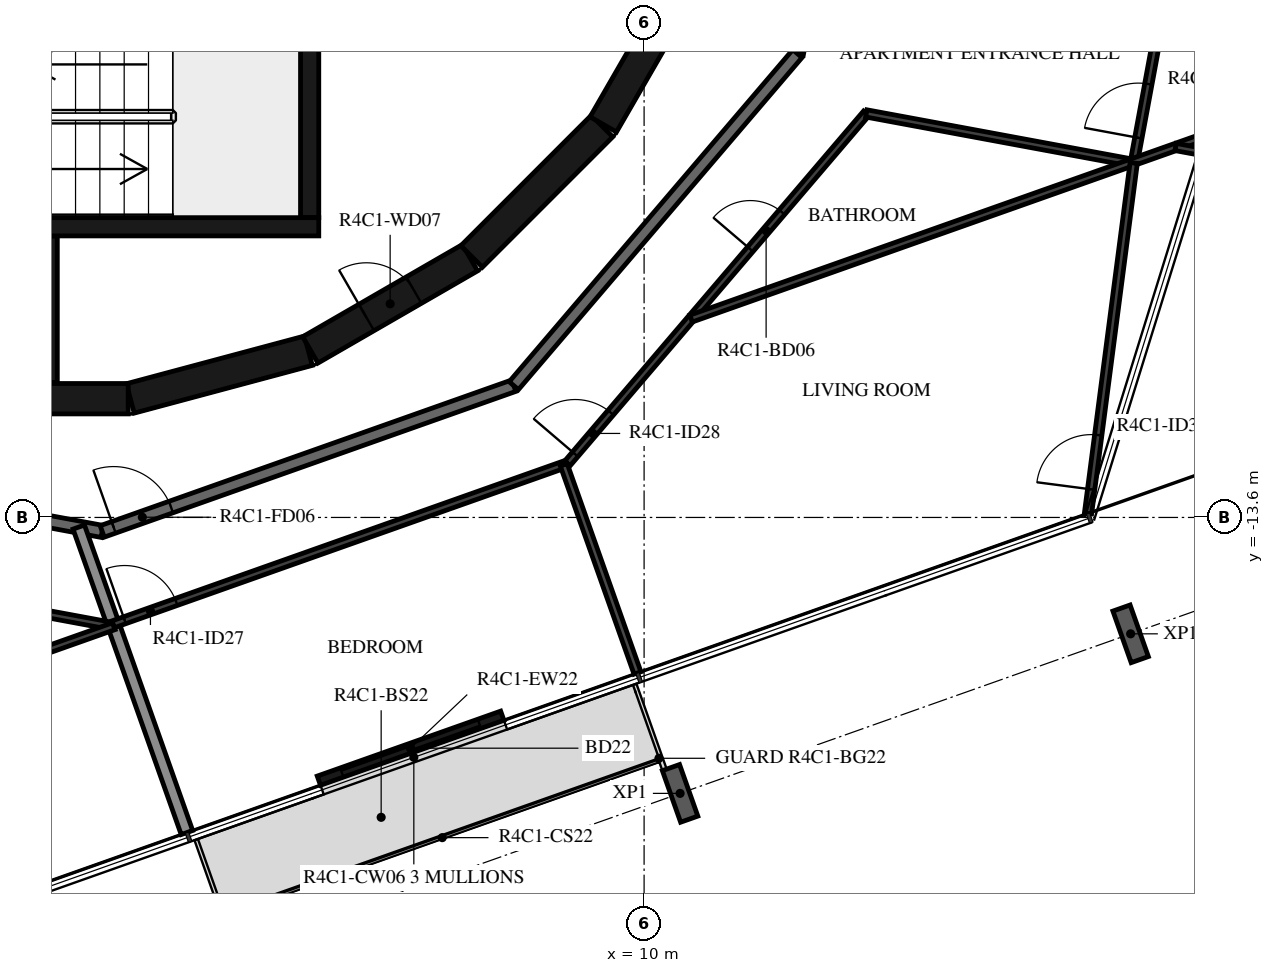
"""IFC4 building model, lengths in metres.
Left out: names, types, materials, properties, quantities, classifications, styles, units other than length and angle.
Written with IfcOpenShell. Run it as: python <this file> out.ifc"""

import sys

from ifc_helpers import new_model, si_unit, direction, frame, frame_2d, origin, origin_2d, place, context, subcontext, project, spatial, rectangle, i_section, extrude, element, fill, save


model = new_model("IFC4")
c1 = context("Model", 3, precision=1e-05, world=origin(), true_north=direction((0.0, 1.0)))
c2 = subcontext(c1, "Body", "Model", "MODEL_VIEW")
j1 = project(units=[si_unit("LENGTHUNIT", "METRE"), si_unit("PLANEANGLEUNIT", "RADIAN")], contexts=[c1])
p1 = place(None, origin())
s1 = spatial("IfcSite", under=j1, at=p1, CompositionType="ELEMENT")
p2 = place(p1, origin())
s2 = spatial("IfcBuilding", under=s1, at=p2, CompositionType="ELEMENT")
p3 = place(p2, frame((0.0, 0.0, 176.2)))
s3 = spatial("IfcBuildingStorey", under=s2, at=p3, CompositionType="ELEMENT", Elevation=176.2)
for number, where, z_axis, x_axis in (
    (1, (10.592, -18.138, -0.38), (0.0, 0.0, 1.0), (-0.943, -0.334, 0.0)),
    (2, (18.001, -15.514, -0.38), (0.0, 0.0, 1.0), (-0.943, -0.334, 0.0)),
):
    element("IfcColumn", number, at=place(p3, frame(where, z_axis=z_axis, x_axis=x_axis)), inside=s3, PredefinedType="COLUMN", context=c2, shape_type="SweptSolid", body=[
        extrude(i_section(OverallWidth=0.3, OverallDepth=0.9, WebThickness=0.019, FlangeThickness=0.035, FilletRadius=0.03, at=origin_2d()), origin(), (0.0, 0.0, 1.0), 3.5),
    ])
p4 = place(p3, frame((4.652, -17.929, 0.0), z_axis=(0.0, 0.0, 1.0), x_axis=(0.942620722428, 0.333865502335, 0.0)))
e3 = element("IfcWall", 3, at=p4, inside=s3, PredefinedType="STANDARD", context=c2, shape_type="SweptSolid", body=[
    extrude(rectangle(XDim=3.2, YDim=0.16, at=frame_2d((1.6, 0.0))), origin(), (0.0, 0.0, 1.0), 3.12),
])
p5 = place(p4, frame((0.4, 0.0, 0.0)))
e4 = element("IfcOpeningElement", 4, at=p5, cuts=e3, PredefinedType="OPENING", context=c2, shape_type="SweptSolid", body=[
    extrude(rectangle(XDim=2.4, YDim=2.4, at=frame_2d((1.2, 1.2))), frame((0.0, 0.09, 0.0), z_axis=(0.0, -1.0, 0.0), x_axis=(1.0, 0.0, 0.0)), (0.0, 0.0, 1.0), 0.18),
])
p6 = place(p3, frame((1.55, -11.643, 0.0), z_axis=(0.0, 0.0, 1.0), x_axis=(0.965948410781, 0.258734743916, 0.0)))
e5 = element("IfcWall", 5, at=p6, inside=s3, PredefinedType="SHEAR", context=c2, shape_type="SweptSolid", body=[
    extrude(rectangle(XDim=3.033, YDim=0.5, at=frame_2d((1.516, 0.0))), origin(), (0.0, 0.0, 1.0), 3.12),
])
p7 = place(p3, frame((4.51, -10.845, 0.0), z_axis=(0.0, 0.0, 1.0), x_axis=(0.865975092491, 0.500087131594, 0.0)))
e6 = element("IfcWall", 6, at=p7, inside=s3, PredefinedType="SHEAR", context=c2, shape_type="SweptSolid", body=[
    extrude(rectangle(XDim=3.033, YDim=0.5, at=frame_2d((1.516, 0.0))), origin(), (0.0, 0.0, 1.0), 3.12),
])
p8 = place(p7, frame((1.066, 0.0, 0.0)))
e7 = element("IfcOpeningElement", 7, at=p8, cuts=e6, PredefinedType="OPENING", context=c2, shape_type="SweptSolid", body=[
    extrude(rectangle(XDim=0.9, YDim=2.1, at=frame_2d((0.45, 1.05))), frame((0.0, 0.26, 0.0), z_axis=(0.0, -1.0, 0.0), x_axis=(1.0, 0.0, 0.0)), (0.0, 0.0, 1.0), 0.52),
])
p9 = place(p3, frame((7.164, -9.308, 0.0), z_axis=(0.0, 0.0, 1.0), x_axis=(0.707106781187, 0.707106781187, 0.0)))
e8 = element("IfcWall", 8, at=p9, inside=s3, PredefinedType="SHEAR", context=c2, shape_type="SweptSolid", body=[
    extrude(rectangle(XDim=3.032, YDim=0.5, at=frame_2d((1.516, 0.0))), origin(), (0.0, 0.0, 1.0), 3.12),
])
p10 = place(p3, frame((9.329, -7.137, 0.0), z_axis=(0.0, 0.0, 1.0), x_axis=(0.500087131594, 0.865975092491, 0.0)))
e9 = element("IfcWall", 9, at=p10, inside=s3, PredefinedType="SHEAR", context=c2, shape_type="SweptSolid", body=[
    extrude(rectangle(XDim=3.033, YDim=0.5, at=frame_2d((1.516, 0.0))), origin(), (0.0, 0.0, 1.0), 3.12),
])
p11 = place(p3, frame((-1.516, -11.647, 0.0), z_axis=(0.0, 0.0, 1.0), x_axis=(1.0, 0.0, 0.0)))
e10 = element("IfcWall", 10, at=p11, inside=s3, PredefinedType="SHEAR", context=c2, shape_type="SweptSolid", body=[
    extrude(rectangle(XDim=3.033, YDim=0.5, at=frame_2d((1.516, 0.0))), origin(), (0.0, 0.0, 1.0), 3.12),
])
p12 = place(p11, frame((0.016, 0.0, 0.0)))
e11 = element("IfcOpeningElement", 11, at=p12, cuts=e10, PredefinedType="OPENING", context=c2, shape_type="SweptSolid", body=[
    extrude(rectangle(XDim=1.2, YDim=2.1, at=frame_2d((0.6, 1.05))), frame((0.0, 0.26, 0.0), z_axis=(0.0, -1.0, 0.0), x_axis=(1.0, 0.0, 0.0)), (0.0, 0.0, 1.0), 0.52),
])
p13 = place(p3, frame((4.5, -8.67, 0.0), z_axis=(0.0, 0.0, 1.0), x_axis=(0.0, 1.0, 0.0)))
e12 = element("IfcWall", 12, at=p13, inside=s3, PredefinedType="SHEAR", context=c2, shape_type="SweptSolid", body=[
    extrude(rectangle(XDim=3.32, YDim=0.3, at=frame_2d((1.66, 0.0))), origin(), (0.0, 0.0, 1.0), 3.12),
])
p14 = place(p3, frame((0.1, -8.82, 0.0), z_axis=(0.0, 0.0, 1.0), x_axis=(1.0, 0.0, 0.0)))
e13 = element("IfcWall", 13, at=p14, inside=s3, PredefinedType="SHEAR", context=c2, shape_type="SweptSolid", body=[
    extrude(rectangle(XDim=4.55, YDim=0.3, at=frame_2d((2.275, 0.0))), origin(), (0.0, 0.0, 1.0), 3.12),
])
p15 = place(p3, frame((0.225, -8.97, 0.0), z_axis=(0.0, 0.0, 1.0), x_axis=(0.0, -1.0, 0.0)))
e14 = element("IfcWall", 14, at=p15, inside=s3, PredefinedType="SHEAR", context=c2, shape_type="SweptSolid", body=[
    extrude(rectangle(XDim=2.41, YDim=0.25, at=frame_2d((1.205, 0.0))), origin(), (0.0, 0.0, 1.0), 3.12),
])
p16 = place(p3, frame((12.521, -5.972, 0.0), z_axis=(0.0, 0.0, 1.0), x_axis=(0.182244189886, 0.983253301674, 0.0)))
e15 = element("IfcWall", 15, at=p16, inside=s3, PredefinedType="STANDARD", context=c2, shape_type="SweptSolid", body=[
    extrude(rectangle(XDim=4.176, YDim=0.2, at=frame_2d((2.088, 0.0))), origin(), (0.0, 0.0, 1.0), 3.12),
])
p17 = place(p16, frame((2.645, 0.0, 0.0)))
e16 = element("IfcOpeningElement", 16, at=p17, cuts=e15, PredefinedType="OPENING", context=c2, shape_type="SweptSolid", body=[
    extrude(rectangle(XDim=1.2, YDim=2.1, at=frame_2d((0.6, 1.05))), frame((0.0, 0.11, 0.0), z_axis=(0.0, -1.0, 0.0), x_axis=(1.0, 0.0, 0.0)), (0.0, 0.0, 1.0), 0.22),
])
p18 = place(p3, frame((-5.972, -12.521, 0.0), z_axis=(0.0, 0.0, 1.0), x_axis=(0.983256068163, -0.18222926335, 0.0)))
e17 = element("IfcWall", 17, at=p18, inside=s3, PredefinedType="STANDARD", context=c2, shape_type="SweptSolid", body=[
    extrude(rectangle(XDim=7.181, YDim=0.2, at=frame_2d((3.59, 0.0))), origin(), (0.0, 0.0, 1.0), 3.12),
])
p19 = place(p18, frame((4.7, 0.0, 0.0)))
e18 = element("IfcOpeningElement", 18, at=p19, cuts=e17, PredefinedType="OPENING", context=c2, shape_type="SweptSolid", body=[
    extrude(rectangle(XDim=1.0, YDim=2.1, at=frame_2d((0.5, 1.05))), frame((0.0, 0.11, 0.0), z_axis=(0.0, -1.0, 0.0), x_axis=(1.0, 0.0, 0.0)), (0.0, 0.0, 1.0), 0.22),
])
p20 = place(p3, frame((1.088, -13.83, 0.0), z_axis=(0.0, 0.0, 1.0), x_axis=(0.942648397945, 0.333787354241, 0.0)))
e19 = element("IfcWall", 19, at=p20, inside=s3, PredefinedType="STANDARD", context=c2, shape_type="SweptSolid", body=[
    extrude(rectangle(XDim=7.181, YDim=0.2, at=frame_2d((3.591, 0.0))), origin(), (0.0, 0.0, 1.0), 3.12),
])
p21 = place(p20, frame((0.2, 0.0, 0.0)))
e20 = element("IfcOpeningElement", 20, at=p21, cuts=e19, PredefinedType="OPENING", context=c2, shape_type="SweptSolid", body=[
    extrude(rectangle(XDim=1.0, YDim=2.1, at=frame_2d((0.5, 1.05))), frame((0.0, 0.11, 0.0), z_axis=(0.0, -1.0, 0.0), x_axis=(1.0, 0.0, 0.0)), (0.0, 0.0, 1.0), 0.22),
])
p22 = place(p3, frame((7.858, -11.433, 0.0), z_axis=(0.0, 0.0, 1.0), x_axis=(0.649440801937, 0.760412154545, 0.0)))
e21 = element("IfcWall", 21, at=p22, inside=s3, PredefinedType="STANDARD", context=c2, shape_type="SweptSolid", body=[
    extrude(rectangle(XDim=7.181, YDim=0.2, at=frame_2d((3.59, 0.0))), origin(), (0.0, 0.0, 1.0), 3.12),
])
p23 = place(p3, frame((2.482, -18.782, 0.0), z_axis=(0.0, 0.0, 1.0), x_axis=(-0.333807281402, 0.942641341594, 0.0)))
e22 = element("IfcWall", 22, at=p23, inside=s3, PredefinedType="STANDARD", context=c2, shape_type="SweptSolid", body=[
    extrude(rectangle(XDim=5.329, YDim=0.2, at=frame_2d((2.665, 0.0))), origin(), (0.0, 0.0, 1.0), 2.73),
])
p24 = place(p3, frame((-6.641, -13.923, 0.0), z_axis=(0.0, 0.0, 1.0), x_axis=(0.983250157272, -0.182261153912, 0.0)))
e23 = element("IfcWall", 23, at=p24, inside=s3, PredefinedType="PARTITIONING", context=c2, shape_type="SweptSolid", body=[
    extrude(rectangle(XDim=7.985, YDim=0.12, at=frame_2d((3.992, 0.0))), origin(), (0.0, 0.0, 1.0), 3.12),
])
p25 = place(p24, frame((1.612, 0.0, 0.0)))
e24 = element("IfcOpeningElement", 24, at=p25, cuts=e23, PredefinedType="OPENING", context=c2, shape_type="SweptSolid", body=[
    extrude(rectangle(XDim=0.8, YDim=2.1, at=frame_2d((0.4, 1.05))), frame((0.0, 0.07, 0.0), z_axis=(0.0, -1.0, 0.0), x_axis=(1.0, 0.0, 0.0)), (0.0, 0.0, 1.0), 0.14),
])
p26 = place(p3, frame((-12.015, -20.096, 0.0), z_axis=(0.0, 0.0, 1.0), x_axis=(0.942638913957, 0.33381413675, 0.0)))
e25 = element("IfcWall", 25, at=p26, inside=s3, PredefinedType="PARTITIONING", context=c2, shape_type="SweptSolid", body=[
    extrude(rectangle(XDim=14.104, YDim=0.12, at=frame_2d((7.052, 0.0))), origin(), (0.0, 0.0, 1.0), 3.12),
])
p27 = place(p26, frame((2.814, 0.0, 0.0)))
e26 = element("IfcOpeningElement", 26, at=p27, cuts=e25, PredefinedType="OPENING", context=c2, shape_type="SweptSolid", body=[
    extrude(rectangle(XDim=0.9, YDim=2.1, at=frame_2d((0.45, 1.05))), frame((0.0, 0.07, 0.0), z_axis=(0.0, -1.0, 0.0), x_axis=(1.0, 0.0, 0.0)), (0.0, 0.0, 1.0), 0.14),
])
p28 = place(p26, frame((6.444, 0.0, 0.0)))
e27 = element("IfcOpeningElement", 27, at=p28, cuts=e25, PredefinedType="OPENING", context=c2, shape_type="SweptSolid", body=[
    extrude(rectangle(XDim=0.9, YDim=2.1, at=frame_2d((0.45, 1.05))), frame((0.0, 0.07, 0.0), z_axis=(0.0, -1.0, 0.0), x_axis=(1.0, 0.0, 0.0)), (0.0, 0.0, 1.0), 0.14),
])
p29 = place(p26, frame((0.2, 0.0, 0.0)))
e28 = element("IfcOpeningElement", 28, at=p29, cuts=e25, PredefinedType="OPENING", context=c2, shape_type="SweptSolid", body=[
    extrude(rectangle(XDim=0.9, YDim=2.1, at=frame_2d((0.45, 1.05))), frame((0.0, 0.07, 0.0), z_axis=(0.0, -1.0, 0.0), x_axis=(1.0, 0.0, 0.0)), (0.0, 0.0, 1.0), 0.14),
])
p30 = place(p3, frame((1.269, -15.357, 0.0), z_axis=(0.0, 0.0, 1.0), x_axis=(0.942639442898, 0.333812643101, 0.0)))
e29 = element("IfcWall", 29, at=p30, inside=s3, PredefinedType="PARTITIONING", context=c2, shape_type="SweptSolid", body=[
    extrude(rectangle(XDim=7.86, YDim=0.12, at=frame_2d((3.93, 0.0))), origin(), (0.0, 0.0, 1.0), 3.12),
])
p31 = place(p30, frame((0.2, 0.0, 0.0)))
e30 = element("IfcOpeningElement", 30, at=p31, cuts=e29, PredefinedType="OPENING", context=c2, shape_type="SweptSolid", body=[
    extrude(rectangle(XDim=0.9, YDim=2.1, at=frame_2d((0.45, 1.05))), frame((0.0, 0.07, 0.0), z_axis=(0.0, -1.0, 0.0), x_axis=(1.0, 0.0, 0.0)), (0.0, 0.0, 1.0), 0.14),
])
p32 = place(p3, frame((8.737, -12.713, 0.0), z_axis=(0.0, 0.0, 1.0), x_axis=(0.649427973074, 0.760423111031, 0.0)))
e31 = element("IfcWall", 31, at=p32, inside=s3, PredefinedType="PARTITIONING", context=c2, shape_type="SweptSolid", body=[
    extrude(rectangle(XDim=7.571, YDim=0.12, at=frame_2d((3.785, 0.0))), origin(), (0.0, 0.0, 1.0), 3.12),
])
p33 = place(p32, frame((0.2, 0.0, 0.0)))
e32 = element("IfcOpeningElement", 32, at=p33, cuts=e31, PredefinedType="OPENING", context=c2, shape_type="SweptSolid", body=[
    extrude(rectangle(XDim=0.9, YDim=2.1, at=frame_2d((0.45, 1.05))), frame((0.0, 0.07, 0.0), z_axis=(0.0, -1.0, 0.0), x_axis=(1.0, 0.0, 0.0)), (0.0, 0.0, 1.0), 0.14),
])
p34 = place(p32, frame((4.634, 0.0, 0.0)))
e33 = element("IfcOpeningElement", 33, at=p34, cuts=e31, PredefinedType="OPENING", context=c2, shape_type="SweptSolid", body=[
    extrude(rectangle(XDim=0.8, YDim=2.1, at=frame_2d((0.4, 1.05))), frame((0.0, 0.07, 0.0), z_axis=(0.0, -1.0, 0.0), x_axis=(1.0, 0.0, 0.0)), (0.0, 0.0, 1.0), 0.14),
])
p35 = place(p3, frame((13.654, -6.956, 0.0), z_axis=(0.0, 0.0, 1.0), x_axis=(0.983253166233, -0.18224492062, 0.0)))
e34 = element("IfcWall", 34, at=p35, inside=s3, PredefinedType="PARTITIONING", context=c2, shape_type="SweptSolid", body=[
    extrude(rectangle(XDim=4.437, YDim=0.12, at=frame_2d((2.218, 0.0))), origin(), (0.0, 0.0, 1.0), 3.12),
])
p36 = place(p3, frame((18.055, -7.75, 0.0), z_axis=(0.0, 0.0, 1.0), x_axis=(0.18225497314, 0.983251302957, 0.0)))
e35 = element("IfcWall", 35, at=p36, inside=s3, PredefinedType="PARTITIONING", context=c2, shape_type="SweptSolid", body=[
    extrude(rectangle(XDim=2.479, YDim=0.12, at=frame_2d((1.24, 0.0))), origin(), (0.0, 0.0, 1.0), 3.12),
])
p37 = place(p36, frame((0.4, 0.0, 0.0)))
e36 = element("IfcOpeningElement", 36, at=p37, cuts=e35, PredefinedType="OPENING", context=c2, shape_type="SweptSolid", body=[
    extrude(rectangle(XDim=0.9, YDim=2.1, at=frame_2d((0.45, 1.05))), frame((0.0, 0.07, 0.0), z_axis=(0.0, -1.0, 0.0), x_axis=(1.0, 0.0, 0.0)), (0.0, 0.0, 1.0), 0.14),
])
p38 = place(p3, frame((9.891, -16.158, 0.0), z_axis=(0.0, 0.0, 1.0), x_axis=(-0.33385336213, 0.942625022262, 0.0)))
e37 = element("IfcWall", 37, at=p38, inside=s3, PredefinedType="PARTITIONING", context=c2, shape_type="SweptSolid", body=[
    extrude(rectangle(XDim=3.633, YDim=0.12, at=frame_2d((1.816, 0.0))), origin(), (0.0, 0.0, 1.0), 2.73),
])
p39 = place(p3, frame((21.362, -6.58, 0.0), z_axis=(0.0, 0.0, 1.0), x_axis=(-0.942647598157, -0.333789612913, 0.0)))
e38 = element("IfcWall", 38, at=p39, inside=s3, PredefinedType="PARTITIONING", context=c2, shape_type="SweptSolid", body=[
    extrude(rectangle(XDim=11.234, YDim=0.12, at=frame_2d((5.617, 0.0))), origin(), (0.0, 0.0, 1.0), 3.12),
])
p40 = place(p3, frame((17.3, -13.534, 0.0), z_axis=(0.0, 0.0, 1.0), x_axis=(0.129290698847, 0.99160673414, 0.0)))
e39 = element("IfcWall", 39, at=p40, inside=s3, PredefinedType="PARTITIONING", context=c2, shape_type="SweptSolid", body=[
    extrude(rectangle(XDim=5.812, YDim=0.12, at=frame_2d((2.906, 0.0))), origin(), (0.0, 0.0, 1.0), 3.12),
])
p41 = place(p40, frame((0.4, 0.0, 0.0)))
e40 = element("IfcOpeningElement", 40, at=p41, cuts=e39, PredefinedType="OPENING", context=c2, shape_type="SweptSolid", body=[
    extrude(rectangle(XDim=0.9, YDim=2.1, at=frame_2d((0.45, 1.05))), frame((0.0, 0.07, 0.0), z_axis=(0.0, -1.0, 0.0), x_axis=(1.0, 0.0, 0.0)), (0.0, 0.0, 1.0), 0.14),
])
p42 = place(p3, frame((26.774, -8.997, 0.0), z_axis=(0.0, 0.0, 1.0), x_axis=(-0.983258019748, 0.18221873285, 0.0)))
e41 = element("IfcWall", 41, at=p42, inside=s3, PredefinedType="PARTITIONING", context=c2, shape_type="SweptSolid", body=[
    extrude(rectangle(XDim=8.17, YDim=0.12, at=frame_2d((4.085, 0.0))), origin(), (0.0, 0.0, 1.0), 3.12),
])
p43 = place(p42, frame((0.5, 0.0, 0.0)))
e42 = element("IfcOpeningElement", 42, at=p43, cuts=e41, PredefinedType="OPENING", context=c2, shape_type="SweptSolid", body=[
    extrude(rectangle(XDim=0.9, YDim=2.1, at=frame_2d((0.45, 1.05))), frame((0.0, 0.07, 0.0), z_axis=(0.0, -1.0, 0.0), x_axis=(1.0, 0.0, 0.0)), (0.0, 0.0, 1.0), 0.14),
])
p44 = place(p5, origin())
e43 = element("IfcDoor", 43, at=p44, inside=s3, OperationType="DOUBLE_DOOR_SLIDING", PredefinedType="DOOR", context=c2, shape_type="SweptSolid", body=[
    extrude(rectangle(XDim=2.4, YDim=2.4, at=frame_2d((1.2, 1.2))), frame((0.0, 0.025, 0.0), z_axis=(0.0, -1.0, 0.0), x_axis=(1.0, 0.0, 0.0)), (0.0, 0.0, 1.0), 0.05),
])
fill(e4, e43)
p45 = place(p8, origin())
e44 = element("IfcDoor", 44, at=p45, inside=s3, OperationType="SINGLE_SWING_LEFT", PredefinedType="DOOR", context=c2, shape_type="SweptSolid", body=[
    extrude(rectangle(XDim=0.9, YDim=2.1, at=frame_2d((0.45, 1.05))), frame((0.0, 0.025, 0.0), z_axis=(0.0, -1.0, 0.0), x_axis=(1.0, 0.0, 0.0)), (0.0, 0.0, 1.0), 0.05),
])
fill(e7, e44)
p46 = place(p21, origin())
e45 = element("IfcDoor", 45, at=p46, inside=s3, OperationType="SINGLE_SWING_LEFT", PredefinedType="DOOR", context=c2, shape_type="SweptSolid", body=[
    extrude(rectangle(XDim=1.0, YDim=2.1, at=frame_2d((0.5, 1.05))), frame((0.0, 0.025, 0.0), z_axis=(0.0, -1.0, 0.0), x_axis=(1.0, 0.0, 0.0)), (0.0, 0.0, 1.0), 0.05),
])
fill(e20, e45)
p47 = place(p31, origin())
e46 = element("IfcDoor", 46, at=p47, inside=s3, OperationType="SINGLE_SWING_LEFT", PredefinedType="DOOR", context=c2, shape_type="SweptSolid", body=[
    extrude(rectangle(XDim=0.9, YDim=2.1, at=frame_2d((0.45, 1.05))), frame((0.0, 0.025, 0.0), z_axis=(0.0, -1.0, 0.0), x_axis=(1.0, 0.0, 0.0)), (0.0, 0.0, 1.0), 0.05),
])
fill(e30, e46)
p48 = place(p33, origin())
e47 = element("IfcDoor", 47, at=p48, inside=s3, OperationType="SINGLE_SWING_RIGHT", PredefinedType="DOOR", context=c2, shape_type="SweptSolid", body=[
    extrude(rectangle(XDim=0.9, YDim=2.1, at=frame_2d((0.45, 1.05))), frame((0.0, 0.025, 0.0), z_axis=(0.0, -1.0, 0.0), x_axis=(1.0, 0.0, 0.0)), (0.0, 0.0, 1.0), 0.05),
])
fill(e32, e47)
p49 = place(p34, origin())
e48 = element("IfcDoor", 48, at=p49, inside=s3, OperationType="SINGLE_SWING_RIGHT", PredefinedType="DOOR", context=c2, shape_type="SweptSolid", body=[
    extrude(rectangle(XDim=0.8, YDim=2.1, at=frame_2d((0.4, 1.05))), frame((0.0, 0.025, 0.0), z_axis=(0.0, -1.0, 0.0), x_axis=(1.0, 0.0, 0.0)), (0.0, 0.0, 1.0), 0.05),
])
fill(e33, e48)
p50 = place(p37, origin())
e49 = element("IfcDoor", 49, at=p50, inside=s3, OperationType="SINGLE_SWING_RIGHT", PredefinedType="DOOR", context=c2, shape_type="SweptSolid", body=[
    extrude(rectangle(XDim=0.9, YDim=2.1, at=frame_2d((0.45, 1.05))), frame((0.0, 0.025, 0.0), z_axis=(0.0, -1.0, 0.0), x_axis=(1.0, 0.0, 0.0)), (0.0, 0.0, 1.0), 0.05),
])
fill(e36, e49)
p51 = place(p41, origin())
e50 = element("IfcDoor", 50, at=p51, inside=s3, OperationType="SINGLE_SWING_RIGHT", PredefinedType="DOOR", context=c2, shape_type="SweptSolid", body=[
    extrude(rectangle(XDim=0.9, YDim=2.1, at=frame_2d((0.45, 1.05))), frame((0.0, 0.025, 0.0), z_axis=(0.0, -1.0, 0.0), x_axis=(1.0, 0.0, 0.0)), (0.0, 0.0, 1.0), 0.05),
])
fill(e40, e50)
save(model, sys.argv[1])
